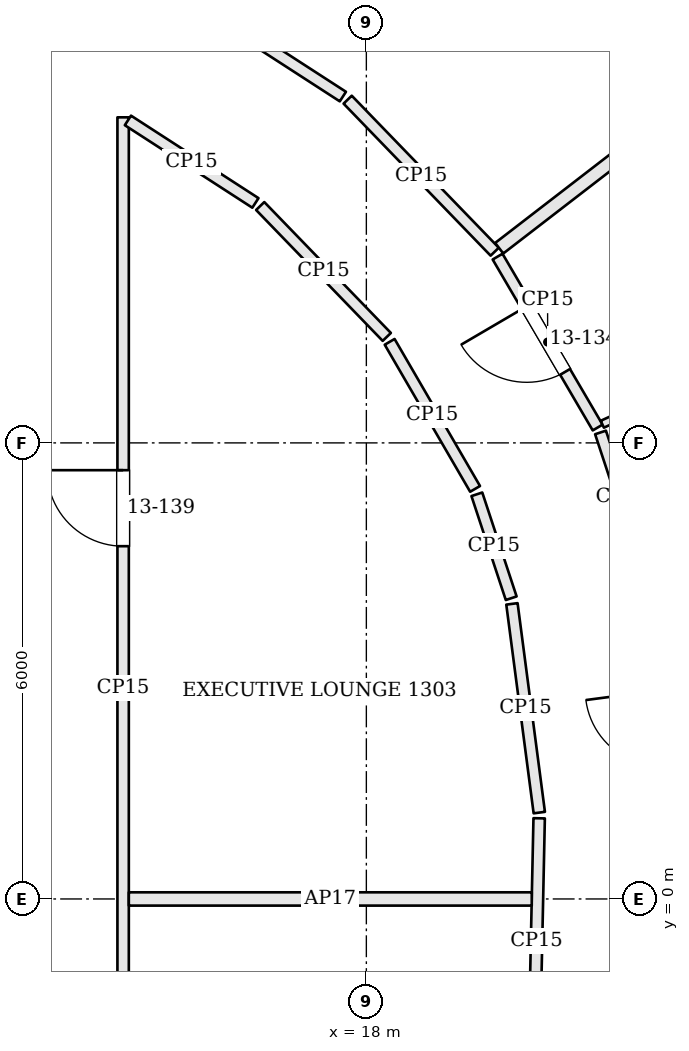
"""IFC4 building model, lengths in metres.
Left out: names, types, materials, properties, quantities, classifications, styles, units other than length and angle.
Written with IfcOpenShell. Run it as: python <this file> out.ifc"""

import sys

from ifc_helpers import new_model, si_unit, direction, frame, frame_2d, origin, place, context, subcontext, project, spatial, rectangle, extrude, element, fill, save


model = new_model("IFC4")
c1 = context("Model", 3, precision=1e-05, world=origin(), true_north=direction((0.0, 1.0)))
c2 = subcontext(c1, "Body", "Model", "MODEL_VIEW")
j1 = project(units=[si_unit("LENGTHUNIT", "METRE"), si_unit("PLANEANGLEUNIT", "RADIAN")], contexts=[c1])
p1 = place(None, origin())
s1 = spatial("IfcSite", under=j1, at=p1, CompositionType="ELEMENT")
p2 = place(p1, origin())
s2 = spatial("IfcBuilding", under=s1, at=p2, CompositionType="ELEMENT")
p3 = place(p2, frame((0.0, 0.0, 62.7)))
s3 = spatial("IfcBuildingStorey", under=s2, at=p3, CompositionType="ELEMENT", Elevation=62.7)
p4 = place(p3, frame((19.689, 8.515, 0.0), z_axis=(0.0, 0.0, 1.0), x_axis=(-0.695251868619, 0.718766192292, 0.0)))
e1 = element("IfcWall", 1, at=p4, inside=s3, PredefinedType="PARTITIONING", context=c2, shape_type="SweptSolid", body=[
    extrude(rectangle(XDim=2.782, YDim=0.15, at=frame_2d((1.391, 0.0))), origin(), (0.0, 0.0, 1.0), 2.68),
])
p5 = place(p3, frame((17.691, 10.556, 0.0), z_axis=(0.0, 0.0, 1.0), x_axis=(-0.839564450265, 0.54326009779, 0.0)))
e2 = element("IfcWall", 2, at=p5, inside=s3, PredefinedType="PARTITIONING", context=c2, shape_type="SweptSolid", body=[
    extrude(rectangle(XDim=3.443, YDim=0.15, at=frame_2d((1.722, 0.0))), origin(), (0.0, 0.0, 1.0), 2.68),
])
p6 = place(p3, frame((26.021, 13.398, 0.0), z_axis=(0.0, 0.0, 1.0), x_axis=(-0.791914254245, -0.610632306649, 0.0)))
e3 = element("IfcWall", 3, at=p6, inside=s3, PredefinedType="PARTITIONING", context=c2, shape_type="SweptSolid", body=[
    extrude(rectangle(XDim=7.922, YDim=0.175, at=frame_2d((3.961, 0.0))), origin(), (0.0, 0.0, 1.0), 2.68),
])
p7 = place(p3, frame((21.645, 4.43, 0.0), z_axis=(0.0, 0.0, 1.0), x_axis=(-0.313700743044, 0.949521902756, 0.0)))
e4 = element("IfcWall", 4, at=p7, inside=s3, PredefinedType="PARTITIONING", context=c2, shape_type="SweptSolid", body=[
    extrude(rectangle(XDim=1.798, YDim=0.15, at=frame_2d((0.899, 0.0))), origin(), (0.0, 0.0, 1.0), 2.68),
])
p8 = place(p3, frame((21.043, 6.202, 0.0), z_axis=(0.0, 0.0, 1.0), x_axis=(-0.50523366897, 0.862982583682, 0.0)))
e5 = element("IfcWall", 5, at=p8, inside=s3, PredefinedType="PARTITIONING", context=c2, shape_type="SweptSolid", body=[
    extrude(rectangle(XDim=2.605, YDim=0.15, at=frame_2d((1.303, 0.0))), origin(), (0.0, 0.0, 1.0), 2.68),
])
p9 = place(p8, frame((0.848, 0.0, 0.0)))
e6 = element("IfcOpeningElement", 6, at=p9, cuts=e5, PredefinedType="OPENING", context=c2, shape_type="SweptSolid", body=[
    extrude(rectangle(XDim=1.0, YDim=2.1, at=frame_2d((0.5, 1.05))), frame((0.0, 0.085, 0.0), z_axis=(0.0, -1.0, 0.0), x_axis=(1.0, 0.0, 0.0)), (0.0, 0.0, 1.0), 0.17),
])
p10 = place(p3, frame((16.604, 9.116, 0.0), z_axis=(0.0, 0.0, 1.0), x_axis=(0.695185405932, -0.718830474716, 0.0)))
e7 = element("IfcWall", 7, at=p10, inside=s3, PredefinedType="PARTITIONING", context=c2, shape_type="SweptSolid", body=[
    extrude(rectangle(XDim=2.396, YDim=0.15, at=frame_2d((1.198, 0.0))), origin(), (0.0, 0.0, 1.0), 2.68),
])
p11 = place(p3, frame((18.306, 7.329, 0.0), z_axis=(0.0, 0.0, 1.0), x_axis=(0.502425081691, -0.864620747662, 0.0)))
e8 = element("IfcWall", 8, at=p11, inside=s3, PredefinedType="PARTITIONING", context=c2, shape_type="SweptSolid", body=[
    extrude(rectangle(XDim=2.237, YDim=0.15, at=frame_2d((1.119, 0.0))), origin(), (0.0, 0.0, 1.0), 2.68),
])
p12 = place(p3, frame((19.454, 5.324, 0.0), z_axis=(0.0, 0.0, 1.0), x_axis=(0.313632756375, -0.949544361327, 0.0)))
e9 = element("IfcWall", 9, at=p12, inside=s3, PredefinedType="PARTITIONING", context=c2, shape_type="SweptSolid", body=[
    extrude(rectangle(XDim=1.44, YDim=0.15, at=frame_2d((0.72, 0.0))), origin(), (0.0, 0.0, 1.0), 2.68),
])
p13 = place(p3, frame((19.915, 3.882, 0.0), z_axis=(0.0, 0.0, 1.0), x_axis=(0.129945947446, -0.991521079323, 0.0)))
e10 = element("IfcWall", 10, at=p13, inside=s3, PredefinedType="PARTITIONING", context=c2, shape_type="SweptSolid", body=[
    extrude(rectangle(XDim=2.769, YDim=0.15, at=frame_2d((1.385, 0.0))), origin(), (0.0, 0.0, 1.0), 2.68),
])
p14 = place(p3, frame((20.273, 1.061, 0.0), z_axis=(0.0, 0.0, 1.0), x_axis=(-0.021166906337, -0.99977595594, 0.0)))
e11 = element("IfcWall", 11, at=p14, inside=s3, PredefinedType="PARTITIONING", context=c2, shape_type="SweptSolid", body=[
    extrude(rectangle(XDim=3.218, YDim=0.15, at=frame_2d((1.609, 0.0))), origin(), (0.0, 0.0, 1.0), 2.68),
])
p15 = place(p3, frame((14.8, -4.725, 0.0), z_axis=(0.0, 0.0, 1.0), x_axis=(0.0, 1.0, 0.0)))
e12 = element("IfcWall", 12, at=p15, inside=s3, PredefinedType="PARTITIONING", context=c2, shape_type="SweptSolid", body=[
    extrude(rectangle(XDim=15.008, YDim=0.15, at=frame_2d((7.504, 0.0))), origin(), (0.0, 0.0, 1.0), 2.68),
])
p16 = place(p15, frame((9.366, 0.0, 0.0)))
e13 = element("IfcOpeningElement", 13, at=p16, cuts=e12, PredefinedType="OPENING", context=c2, shape_type="SweptSolid", body=[
    extrude(rectangle(XDim=1.0, YDim=2.1, at=frame_2d((0.5, 1.05))), frame((0.0, 0.085, 0.0), z_axis=(0.0, -1.0, 0.0), x_axis=(1.0, 0.0, 0.0)), (0.0, 0.0, 1.0), 0.17),
])
p17 = place(p3, frame((14.863, 10.242, 0.0), z_axis=(0.0, 0.0, 1.0), x_axis=(0.839530811724, -0.543312079901, 0.0)))
e14 = element("IfcWall", 14, at=p17, inside=s3, PredefinedType="PARTITIONING", context=c2, shape_type="SweptSolid", body=[
    extrude(rectangle(XDim=1.998, YDim=0.15, at=frame_2d((0.999, 0.0))), origin(), (0.0, 0.0, 1.0), 2.68),
])
p18 = place(p3, frame((26.329, 8.631, 0.0), z_axis=(0.0, 0.0, 1.0), x_axis=(-0.909688352961, -0.415291584899, 0.0)))
e15 = element("IfcWall", 15, at=p18, inside=s3, PredefinedType="PARTITIONING", context=c2, shape_type="SweptSolid", body=[
    extrude(rectangle(XDim=5.744, YDim=0.1, at=frame_2d((2.872, 0.0))), origin(), (0.0, 0.0, 1.0), 2.68),
])
p19 = place(p18, frame((1.85, 0.0, 0.0)))
e16 = element("IfcOpeningElement", 16, at=p19, cuts=e15, PredefinedType="OPENING", context=c2, shape_type="SweptSolid", body=[
    extrude(rectangle(XDim=0.9, YDim=2.4, at=frame_2d((0.45, 1.2))), frame((0.0, 0.06, 0.0), z_axis=(0.0, -1.0, 0.0), x_axis=(1.0, 0.0, 0.0)), (0.0, 0.0, 1.0), 0.12),
])
p20 = place(p3, frame((14.875, 0.0, 0.0), z_axis=(0.0, 0.0, 1.0), x_axis=(1.0, 0.0, 0.0)))
e17 = element("IfcWall", 17, at=p20, inside=s3, PredefinedType="PARTITIONING", context=c2, shape_type="SweptSolid", body=[
    extrude(rectangle(XDim=5.301, YDim=0.175, at=frame_2d((2.65, 0.0))), origin(), (0.0, 0.0, 1.0), 2.68),
])
p21 = place(p9, origin())
e18 = element("IfcDoor", 18, at=p21, inside=s3, OperationType="SINGLE_SWING_RIGHT", PredefinedType="DOOR", context=c2, shape_type="SweptSolid", body=[
    extrude(rectangle(XDim=1.0, YDim=2.1, at=frame_2d((0.5, 1.05))), frame((0.0, 0.025, 0.0), z_axis=(0.0, -1.0, 0.0), x_axis=(1.0, 0.0, 0.0)), (0.0, 0.0, 1.0), 0.05),
])
fill(e6, e18)
p22 = place(p16, origin())
e19 = element("IfcDoor", 19, at=p22, inside=s3, OperationType="SINGLE_SWING_RIGHT", PredefinedType="DOOR", context=c2, shape_type="SweptSolid", body=[
    extrude(rectangle(XDim=1.0, YDim=2.1, at=frame_2d((0.5, 1.05))), frame((0.0, 0.025, 0.0), z_axis=(0.0, -1.0, 0.0), x_axis=(1.0, 0.0, 0.0)), (0.0, 0.0, 1.0), 0.05),
])
fill(e13, e19)
save(model, sys.argv[1])
